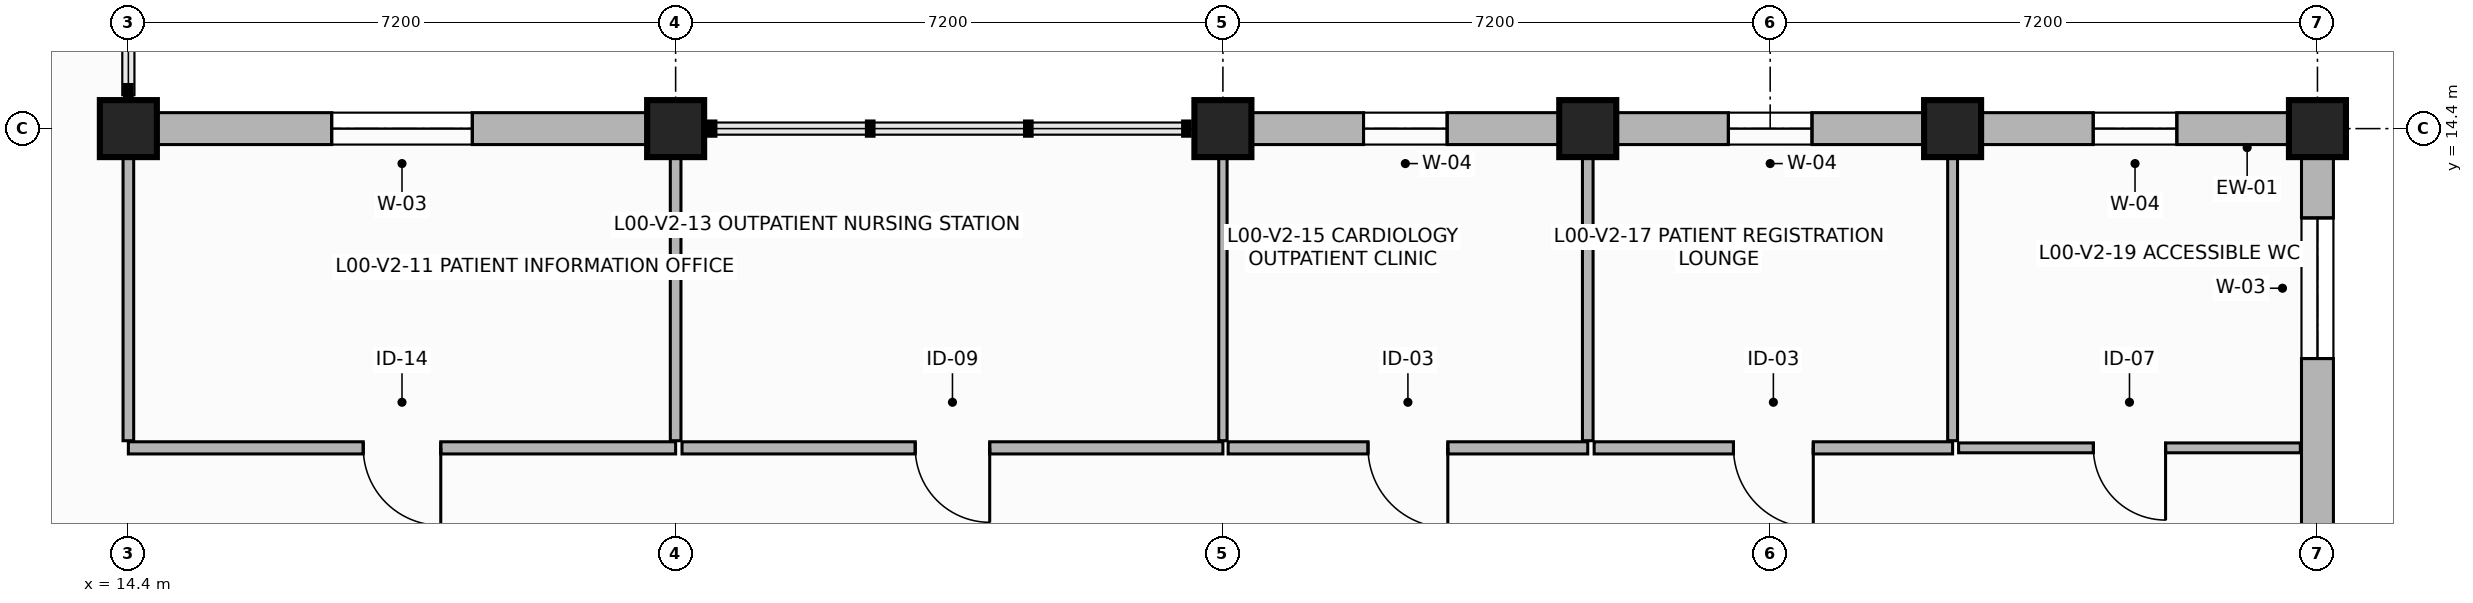
"""IFC4 building model, lengths in metres.
Left out: names, types, materials, properties, quantities, classifications, styles, units other than length and angle.
Written with IfcOpenShell. Run it as: python <this file> out.ifc"""

import sys

from ifc_helpers import new_model, si_unit, direction, frame, frame_2d, origin, origin_2d, place, context, subcontext, project, spatial, rectangle, extrude, element, fill, save


model = new_model("IFC4")
c1 = context("Model", 3, precision=1e-05, world=origin(), true_north=direction((0.0, 1.0)))
c2 = subcontext(c1, "Body", "Model", "MODEL_VIEW")
j1 = project(units=[si_unit("LENGTHUNIT", "METRE"), si_unit("PLANEANGLEUNIT", "RADIAN")], contexts=[c1])
p1 = place(None, origin())
s1 = spatial("IfcSite", under=j1, at=p1, CompositionType="ELEMENT")
p2 = place(p1, origin())
s2 = spatial("IfcBuilding", under=s1, at=p2, CompositionType="ELEMENT")
p3 = place(p2, origin())
s3 = spatial("IfcBuildingStorey", under=s2, at=p3, CompositionType="ELEMENT", Elevation=0.0)
for number, where, z_axis, x_axis in (
    (1, (14.4, 14.4, 0.0), (0.0, 0.0, 1.0), (1.0, 0.0, 0.0)),
    (2, (21.6, 14.4, 0.0), (0.0, 0.0, 1.0), (1.0, 0.0, 0.0)),
    (3, (28.8, 14.4, 0.0), (0.0, 0.0, 1.0), (1.0, 0.0, 0.0)),
    (4, (33.6, 14.4, 0.0), (0.0, 0.0, 1.0), (1.0, 0.0, 0.0)),
    (5, (38.4, 14.4, 0.0), (0.0, 0.0, 1.0), (1.0, 0.0, 0.0)),
    (6, (43.2, 14.4, 0.0), (0.0, 0.0, 1.0), (1.0, 0.0, 0.0)),
):
    element("IfcColumn", number, at=place(p3, frame(where, z_axis=z_axis, x_axis=x_axis)), inside=s3, PredefinedType="COLUMN", context=c2, shape_type="SweptSolid", body=[
        extrude(rectangle(XDim=0.75, YDim=0.75, at=origin_2d()), origin(), (0.0, 0.0, 1.0), 4.22),
    ])
p4 = place(p3, frame((43.2, 7.2, 0.0), z_axis=(0.0, 0.0, 1.0), x_axis=(0.0, 1.0, 0.0)))
e7 = element("IfcWall", 7, at=p4, inside=s3, PredefinedType="SOLIDWALL", context=c2, shape_type="SweptSolid", body=[
    extrude(rectangle(XDim=7.2, YDim=0.42, at=frame_2d((3.6, 0.0))), origin(), (0.0, 0.0, 1.0), 3.6),
])
p5 = place(p4, frame((4.175, 0.0, 0.85)))
e8 = element("IfcOpeningElement", 8, at=p5, cuts=e7, PredefinedType="OPENING", context=c2, shape_type="SweptSolid", body=[
    extrude(rectangle(XDim=1.85, YDim=2.4, at=frame_2d((0.925, 1.2))), frame((0.0, 0.22, 0.0), z_axis=(0.0, -1.0, 0.0), x_axis=(1.0, 0.0, 0.0)), (0.0, 0.0, 1.0), 0.44),
])
p6 = place(p3, frame((43.2, 14.4, 0.0), z_axis=(0.0, 0.0, 1.0), x_axis=(-1.0, 0.0, 0.0)))
e9 = element("IfcWall", 9, at=p6, inside=s3, PredefinedType="SOLIDWALL", context=c2, shape_type="SweptSolid", body=[
    extrude(rectangle(XDim=4.8, YDim=0.42, at=frame_2d((2.4, 0.0))), origin(), (0.0, 0.0, 1.0), 3.6),
])
p7 = place(p6, frame((1.85, 0.0, 0.85)))
e10 = element("IfcOpeningElement", 10, at=p7, cuts=e9, PredefinedType="OPENING", context=c2, shape_type="SweptSolid", body=[
    extrude(rectangle(XDim=1.1, YDim=2.35, at=frame_2d((0.55, 1.175))), frame((0.0, 0.22, 0.0), z_axis=(0.0, -1.0, 0.0), x_axis=(1.0, 0.0, 0.0)), (0.0, 0.0, 1.0), 0.44),
])
p8 = place(p3, frame((38.4, 14.4, 0.0), z_axis=(0.0, 0.0, 1.0), x_axis=(-1.0, 0.0, 0.0)))
e11 = element("IfcWall", 11, at=p8, inside=s3, PredefinedType="SOLIDWALL", context=c2, shape_type="SweptSolid", body=[
    extrude(rectangle(XDim=4.8, YDim=0.42, at=frame_2d((2.4, 0.0))), origin(), (0.0, 0.0, 1.0), 3.6),
])
p9 = place(p8, frame((1.85, 0.0, 0.85)))
e12 = element("IfcOpeningElement", 12, at=p9, cuts=e11, PredefinedType="OPENING", context=c2, shape_type="SweptSolid", body=[
    extrude(rectangle(XDim=1.1, YDim=2.35, at=frame_2d((0.55, 1.175))), frame((0.0, 0.22, 0.0), z_axis=(0.0, -1.0, 0.0), x_axis=(1.0, 0.0, 0.0)), (0.0, 0.0, 1.0), 0.44),
])
p10 = place(p3, frame((33.6, 14.4, 0.0), z_axis=(0.0, 0.0, 1.0), x_axis=(-1.0, 0.0, 0.0)))
e13 = element("IfcWall", 13, at=p10, inside=s3, PredefinedType="SOLIDWALL", context=c2, shape_type="SweptSolid", body=[
    extrude(rectangle(XDim=4.8, YDim=0.42, at=frame_2d((2.4, 0.0))), origin(), (0.0, 0.0, 1.0), 3.6),
])
p11 = place(p10, frame((1.85, 0.0, 0.85)))
e14 = element("IfcOpeningElement", 14, at=p11, cuts=e13, PredefinedType="OPENING", context=c2, shape_type="SweptSolid", body=[
    extrude(rectangle(XDim=1.1, YDim=2.35, at=frame_2d((0.55, 1.175))), frame((0.0, 0.22, 0.0), z_axis=(0.0, -1.0, 0.0), x_axis=(1.0, 0.0, 0.0)), (0.0, 0.0, 1.0), 0.44),
])
p12 = place(p3, frame((21.6, 14.4, 0.0), z_axis=(0.0, 0.0, 1.0), x_axis=(-1.0, 0.0, 0.0)))
e15 = element("IfcWall", 15, at=p12, inside=s3, PredefinedType="SOLIDWALL", context=c2, shape_type="SweptSolid", body=[
    extrude(rectangle(XDim=7.2, YDim=0.42, at=frame_2d((3.6, 0.0))), origin(), (0.0, 0.0, 1.0), 3.6),
])
p13 = place(p12, frame((2.675, 0.0, 0.85)))
e16 = element("IfcOpeningElement", 16, at=p13, cuts=e15, PredefinedType="OPENING", context=c2, shape_type="SweptSolid", body=[
    extrude(rectangle(XDim=1.85, YDim=2.4, at=frame_2d((0.925, 1.2))), frame((0.0, 0.22, 0.0), z_axis=(0.0, -1.0, 0.0), x_axis=(1.0, 0.0, 0.0)), (0.0, 0.0, 1.0), 0.44),
])
p14 = place(p3, frame((21.6, 10.2, 0.0), z_axis=(0.0, 0.0, 1.0), x_axis=(-1.0, 0.0, 0.0)))
e17 = element("IfcWall", 17, at=p14, inside=s3, PredefinedType="PARTITIONING", context=c2, shape_type="SweptSolid", body=[
    extrude(rectangle(XDim=7.2, YDim=0.16, at=frame_2d((3.6, 0.0))), origin(), (0.0, 0.0, 1.0), 3.58),
])
p15 = place(p14, frame((3.09, 0.0, 0.0)))
e18 = element("IfcOpeningElement", 18, at=p15, cuts=e17, PredefinedType="OPENING", context=c2, shape_type="SweptSolid", body=[
    extrude(rectangle(XDim=1.02, YDim=2.15, at=frame_2d((0.51, 1.075))), frame((0.0, 0.09, 0.0), z_axis=(0.0, -1.0, 0.0), x_axis=(1.0, 0.0, 0.0)), (0.0, 0.0, 1.0), 0.18),
])
for number, where, z_axis, x_axis in (
    (19, (14.4, 10.294, 0.0), (0.0, 0.0, 1.0), (0.0, 1.0, 0.0)),
    (20, (21.6, 14.175, 0.0), (0.0, 0.0, 1.0), (0.0, -1.0, 0.0)),
):
    element("IfcWall", number, at=place(p3, frame(where, z_axis=z_axis, x_axis=x_axis)), inside=s3, PredefinedType="PARTITIONING", context=c2, shape_type="SweptSolid", body=[
        extrude(rectangle(XDim=3.881, YDim=0.14, at=frame_2d((1.94, 0.0))), origin(), (0.0, 0.0, 1.0), 3.58),
    ])
p16 = place(p3, frame((28.8, 10.2, 0.0), z_axis=(0.0, 0.0, 1.0), x_axis=(-1.0, 0.0, 0.0)))
e21 = element("IfcWall", 21, at=p16, inside=s3, PredefinedType="PARTITIONING", context=c2, shape_type="SweptSolid", body=[
    extrude(rectangle(XDim=7.116, YDim=0.16, at=frame_2d((3.558, 0.0))), origin(), (0.0, 0.0, 1.0), 3.58),
])
p17 = place(p16, frame((3.068, 0.0, 0.0)))
e22 = element("IfcOpeningElement", 22, at=p17, cuts=e21, PredefinedType="OPENING", context=c2, shape_type="SweptSolid", body=[
    extrude(rectangle(XDim=0.98, YDim=2.15, at=frame_2d((0.49, 1.075))), frame((0.0, 0.09, 0.0), z_axis=(0.0, -1.0, 0.0), x_axis=(1.0, 0.0, 0.0)), (0.0, 0.0, 1.0), 0.18),
])
p18 = place(p3, frame((28.8, 14.175, 0.0), z_axis=(0.0, 0.0, 1.0), x_axis=(0.0, -1.0, 0.0)))
e23 = element("IfcWall", 23, at=p18, inside=s3, PredefinedType="PARTITIONING", context=c2, shape_type="SweptSolid", body=[
    extrude(rectangle(XDim=3.881, YDim=0.11, at=frame_2d((1.94, 0.0))), origin(), (0.0, 0.0, 1.0), 3.58),
])
p19 = place(p3, frame((33.6, 10.2, 0.0), z_axis=(0.0, 0.0, 1.0), x_axis=(-1.0, 0.0, 0.0)))
e24 = element("IfcWall", 24, at=p19, inside=s3, PredefinedType="PARTITIONING", context=c2, shape_type="SweptSolid", body=[
    extrude(rectangle(XDim=4.731, YDim=0.16, at=frame_2d((2.366, 0.0))), origin(), (0.0, 0.0, 1.0), 3.58),
])
p20 = place(p19, frame((1.841, 0.0, 0.0)))
e25 = element("IfcOpeningElement", 25, at=p20, cuts=e24, PredefinedType="OPENING", context=c2, shape_type="SweptSolid", body=[
    extrude(rectangle(XDim=1.05, YDim=2.15, at=frame_2d((0.525, 1.075))), frame((0.0, 0.09, 0.0), z_axis=(0.0, -1.0, 0.0), x_axis=(1.0, 0.0, 0.0)), (0.0, 0.0, 1.0), 0.18),
])
p21 = place(p3, frame((33.6, 14.175, 0.0), z_axis=(0.0, 0.0, 1.0), x_axis=(0.0, -1.0, 0.0)))
e26 = element("IfcWall", 26, at=p21, inside=s3, PredefinedType="PARTITIONING", context=c2, shape_type="SweptSolid", body=[
    extrude(rectangle(XDim=3.881, YDim=0.14, at=frame_2d((1.94, 0.0))), origin(), (0.0, 0.0, 1.0), 3.58),
])
p22 = place(p3, frame((38.4, 10.2, 0.0), z_axis=(0.0, 0.0, 1.0), x_axis=(-1.0, 0.0, 0.0)))
e27 = element("IfcWall", 27, at=p22, inside=s3, PredefinedType="PARTITIONING", context=c2, shape_type="SweptSolid", body=[
    extrude(rectangle(XDim=4.716, YDim=0.16, at=frame_2d((2.358, 0.0))), origin(), (0.0, 0.0, 1.0), 3.58),
])
p23 = place(p22, frame((1.833, 0.0, 0.0)))
e28 = element("IfcOpeningElement", 28, at=p23, cuts=e27, PredefinedType="OPENING", context=c2, shape_type="SweptSolid", body=[
    extrude(rectangle(XDim=1.05, YDim=2.15, at=frame_2d((0.525, 1.075))), frame((0.0, 0.09, 0.0), z_axis=(0.0, -1.0, 0.0), x_axis=(1.0, 0.0, 0.0)), (0.0, 0.0, 1.0), 0.18),
])
p24 = place(p3, frame((38.4, 14.175, 0.0), z_axis=(0.0, 0.0, 1.0), x_axis=(0.0, -1.0, 0.0)))
e29 = element("IfcWall", 29, at=p24, inside=s3, PredefinedType="PARTITIONING", context=c2, shape_type="SweptSolid", body=[
    extrude(rectangle(XDim=3.881, YDim=0.13, at=frame_2d((1.94, 0.0))), origin(), (0.0, 0.0, 1.0), 3.58),
])
p25 = place(p3, frame((42.975, 10.2, 0.0), z_axis=(0.0, 0.0, 1.0), x_axis=(-1.0, 0.0, 0.0)))
e30 = element("IfcWall", 30, at=p25, inside=s3, PredefinedType="PARTITIONING", context=c2, shape_type="SweptSolid", body=[
    extrude(rectangle(XDim=4.496, YDim=0.13, at=frame_2d((2.248, 0.0))), origin(), (0.0, 0.0, 1.0), 3.58),
])
p26 = place(p25, frame((1.773, 0.0, 0.0)))
e31 = element("IfcOpeningElement", 31, at=p26, cuts=e30, PredefinedType="OPENING", context=c2, shape_type="SweptSolid", body=[
    extrude(rectangle(XDim=0.95, YDim=2.1, at=frame_2d((0.475, 1.05))), frame((0.0, 0.075, 0.0), z_axis=(0.0, -1.0, 0.0), x_axis=(1.0, 0.0, 0.0)), (0.0, 0.0, 1.0), 0.15),
])
p27 = place(p5, origin())
e32 = element("IfcWindow", 32, at=p27, inside=s3, PartitioningType="SINGLE_PANEL", PredefinedType="WINDOW", context=c2, shape_type="SweptSolid", body=[
    extrude(rectangle(XDim=1.85, YDim=2.4, at=frame_2d((0.925, 1.2))), frame((0.0, 0.03, 0.0), z_axis=(0.0, -1.0, 0.0), x_axis=(1.0, 0.0, 0.0)), (0.0, 0.0, 1.0), 0.06),
])
fill(e8, e32)
p28 = place(p7, origin())
e33 = element("IfcWindow", 33, at=p28, inside=s3, PartitioningType="SINGLE_PANEL", PredefinedType="WINDOW", context=c2, shape_type="SweptSolid", body=[
    extrude(rectangle(XDim=1.1, YDim=2.35, at=frame_2d((0.55, 1.175))), frame((0.0, 0.03, 0.0), z_axis=(0.0, -1.0, 0.0), x_axis=(1.0, 0.0, 0.0)), (0.0, 0.0, 1.0), 0.06),
])
fill(e10, e33)
p29 = place(p9, origin())
e34 = element("IfcWindow", 34, at=p29, inside=s3, PartitioningType="SINGLE_PANEL", PredefinedType="WINDOW", context=c2, shape_type="SweptSolid", body=[
    extrude(rectangle(XDim=1.1, YDim=2.35, at=frame_2d((0.55, 1.175))), frame((0.0, 0.03, 0.0), z_axis=(0.0, -1.0, 0.0), x_axis=(1.0, 0.0, 0.0)), (0.0, 0.0, 1.0), 0.06),
])
fill(e12, e34)
p30 = place(p11, origin())
e35 = element("IfcWindow", 35, at=p30, inside=s3, PartitioningType="SINGLE_PANEL", PredefinedType="WINDOW", context=c2, shape_type="SweptSolid", body=[
    extrude(rectangle(XDim=1.1, YDim=2.35, at=frame_2d((0.55, 1.175))), frame((0.0, 0.03, 0.0), z_axis=(0.0, -1.0, 0.0), x_axis=(1.0, 0.0, 0.0)), (0.0, 0.0, 1.0), 0.06),
])
fill(e14, e35)
p31 = place(p13, origin())
e36 = element("IfcWindow", 36, at=p31, inside=s3, PartitioningType="SINGLE_PANEL", PredefinedType="WINDOW", context=c2, shape_type="SweptSolid", body=[
    extrude(rectangle(XDim=1.85, YDim=2.4, at=frame_2d((0.925, 1.2))), frame((0.0, 0.03, 0.0), z_axis=(0.0, -1.0, 0.0), x_axis=(1.0, 0.0, 0.0)), (0.0, 0.0, 1.0), 0.06),
])
fill(e16, e36)
p32 = place(p15, origin())
e37 = element("IfcDoor", 37, at=p32, inside=s3, OperationType="SINGLE_SWING_LEFT", PredefinedType="DOOR", context=c2, shape_type="SweptSolid", body=[
    extrude(rectangle(XDim=1.02, YDim=2.15, at=frame_2d((0.51, 1.075))), frame((0.0, 0.025, 0.0), z_axis=(0.0, -1.0, 0.0), x_axis=(1.0, 0.0, 0.0)), (0.0, 0.0, 1.0), 0.05),
])
fill(e18, e37)
p33 = place(p17, origin())
e38 = element("IfcDoor", 38, at=p33, inside=s3, OperationType="SINGLE_SWING_LEFT", PredefinedType="DOOR", context=c2, shape_type="SweptSolid", body=[
    extrude(rectangle(XDim=0.98, YDim=2.15, at=frame_2d((0.49, 1.075))), frame((0.0, 0.025, 0.0), z_axis=(0.0, -1.0, 0.0), x_axis=(1.0, 0.0, 0.0)), (0.0, 0.0, 1.0), 0.05),
])
fill(e22, e38)
p34 = place(p20, origin())
e39 = element("IfcDoor", 39, at=p34, inside=s3, OperationType="SINGLE_SWING_LEFT", PredefinedType="DOOR", context=c2, shape_type="SweptSolid", body=[
    extrude(rectangle(XDim=1.05, YDim=2.15, at=frame_2d((0.525, 1.075))), frame((0.0, 0.025, 0.0), z_axis=(0.0, -1.0, 0.0), x_axis=(1.0, 0.0, 0.0)), (0.0, 0.0, 1.0), 0.05),
])
fill(e25, e39)
p35 = place(p23, origin())
e40 = element("IfcDoor", 40, at=p35, inside=s3, OperationType="SINGLE_SWING_LEFT", PredefinedType="DOOR", context=c2, shape_type="SweptSolid", body=[
    extrude(rectangle(XDim=1.05, YDim=2.15, at=frame_2d((0.525, 1.075))), frame((0.0, 0.025, 0.0), z_axis=(0.0, -1.0, 0.0), x_axis=(1.0, 0.0, 0.0)), (0.0, 0.0, 1.0), 0.05),
])
fill(e28, e40)
p36 = place(p26, origin())
e41 = element("IfcDoor", 41, at=p36, inside=s3, OperationType="SINGLE_SWING_LEFT", PredefinedType="DOOR", context=c2, shape_type="SweptSolid", body=[
    extrude(rectangle(XDim=0.95, YDim=2.1, at=frame_2d((0.475, 1.05))), frame((0.0, 0.025, 0.0), z_axis=(0.0, -1.0, 0.0), x_axis=(1.0, 0.0, 0.0)), (0.0, 0.0, 1.0), 0.05),
])
fill(e31, e41)
save(model, sys.argv[1])
